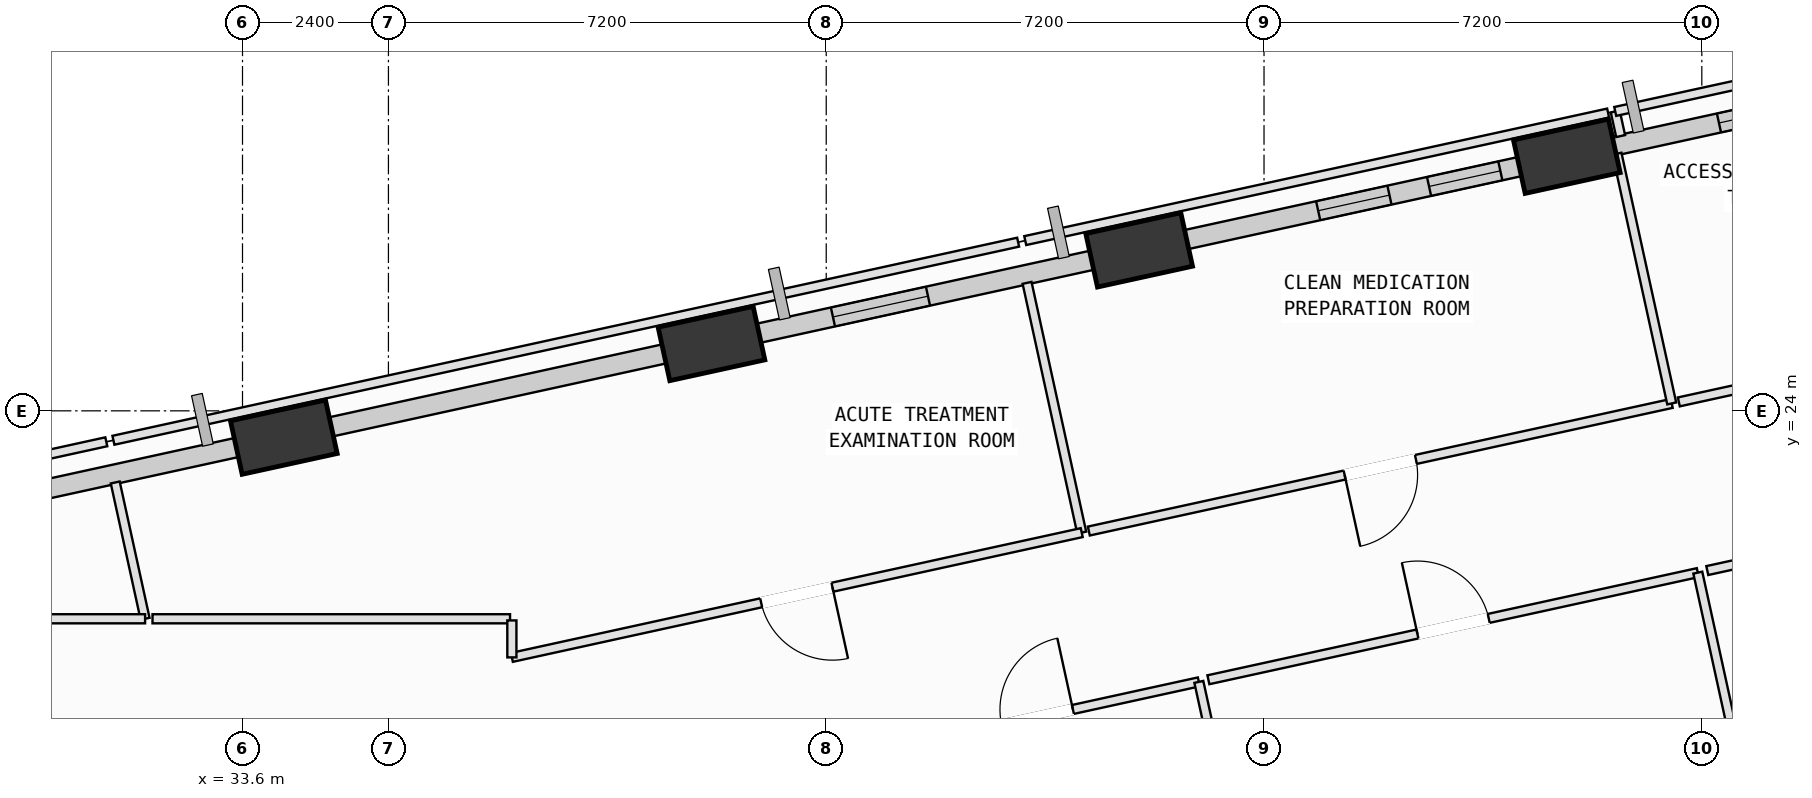
"""IFC4 building model, lengths in metres.
Left out: names, types, materials, properties, quantities, classifications, styles, units other than length and angle.
Written with IfcOpenShell. Run it as: python <this file> out.ifc"""

import sys

from ifc_helpers import new_model, si_unit, direction, frame, frame_2d, origin, origin_2d, place, context, subcontext, project, spatial, rectangle, extrude, element, fill, save


model = new_model("IFC4")
c1 = context("Model", 3, precision=1e-05, world=origin(), true_north=direction((0.0, 1.0)))
c2 = subcontext(c1, "Body", "Model", "MODEL_VIEW")
j1 = project(units=[si_unit("LENGTHUNIT", "METRE"), si_unit("PLANEANGLEUNIT", "RADIAN")], contexts=[c1])
p1 = place(None, origin())
s1 = spatial("IfcSite", under=j1, at=p1, CompositionType="ELEMENT")
p2 = place(p1, origin())
s2 = spatial("IfcBuilding", under=s1, at=p2, CompositionType="ELEMENT")
p3 = place(p2, frame((0.0, 0.0, 75.0)))
s3 = spatial("IfcBuildingStorey", under=s2, at=p3, CompositionType="ELEMENT", Elevation=75.0)
p4 = place(p3, frame((55.38, 28.187, 0.002), z_axis=(-0.014721816855, 0.089790916023, 0.995851826081), x_axis=(-0.929526427486, -0.368241610602, 0.019461161991)))
e1 = element("IfcColumn", 1, at=p4, inside=s3, PredefinedType="COLUMN", context=c2, shape_type="SweptSolid", body=[
    extrude(rectangle(XDim=1.6, YDim=0.9, at=origin_2d()), origin(), (0.0, 0.0, 1.0), 4.013),
])
p5 = place(p3, frame((48.346, 26.647, 0.002), z_axis=(-0.008109234679, 0.060971689318, 0.998106554139), x_axis=(-0.940187690802, -0.340402754479, 0.01315563785)))
e2 = element("IfcColumn", 2, at=p5, inside=s3, PredefinedType="COLUMN", context=c2, shape_type="SweptSolid", body=[
    extrude(rectangle(XDim=1.6, YDim=0.9, at=origin_2d()), origin(), (0.0, 0.0, 1.0), 4.004),
])
p6 = place(p3, frame((41.313, 25.107, 0.002), z_axis=(-0.001587456161, 0.031993347239, 0.999486821181), x_axis=(-0.965064978314, -0.261921072105, 0.00685124938)))
e3 = element("IfcColumn", 3, at=p6, inside=s3, PredefinedType="COLUMN", context=c2, shape_type="SweptSolid", body=[
    extrude(rectangle(XDim=1.6, YDim=0.9, at=origin_2d()), origin(), (0.0, 0.0, 1.0), 3.999),
])
p7 = place(p3, frame((34.28, 23.567, 0.002), z_axis=(0.005070165271, 0.002809971114, 0.999983198602), x_axis=(-0.660600935116, 0.750736216887, 0.001239829666)))
e4 = element("IfcColumn", 4, at=p7, inside=s3, PredefinedType="COLUMN", context=c2, shape_type="SweptSolid", body=[
    extrude(rectangle(XDim=1.6, YDim=0.9, at=origin_2d()), origin(), (0.0, 0.0, 1.0), 3.997),
])
p8 = place(p3, frame((55.956, 28.313, 0.0), z_axis=(0.0, 0.0, 1.0), x_axis=(0.976855050358, 0.213902338907, 0.0)))
e5 = element("IfcWall", 5, at=p8, inside=s3, PredefinedType="SOLIDWALL", context=c2, shape_type="SweptSolid", body=[
    extrude(rectangle(XDim=5.209, YDim=0.32, at=frame_2d((2.604, 0.0))), origin(), (0.0, 0.0, 1.0), 3.165),
])
p9 = place(p8, frame((1.972, 0.0, 0.75)))
e6 = element("IfcOpeningElement", 6, at=p9, cuts=e5, PredefinedType="OPENING", context=c2, shape_type="SweptSolid", body=[
    extrude(rectangle(XDim=1.8, YDim=2.05, at=frame_2d((0.9, 1.025))), frame((0.0, 0.17, 0.0), z_axis=(0.0, -1.0, 0.0), x_axis=(1.0, 0.0, 0.0)), (0.0, 0.0, 1.0), 0.34),
])
p10 = place(p3, frame((48.938, 26.776, 0.0), z_axis=(0.0, 0.0, 1.0), x_axis=(0.976857433448, 0.213891455455, 0.0)))
e7 = element("IfcWall", 7, at=p10, inside=s3, PredefinedType="SOLIDWALL", context=c2, shape_type="SweptSolid", body=[
    extrude(rectangle(XDim=6.024, YDim=0.32, at=frame_2d((3.012, 0.0))), origin(), (0.0, 0.0, 1.0), 3.165),
])
p11 = place(p10, frame((2.409, 0.0, 0.75)))
e8 = element("IfcOpeningElement", 8, at=p11, cuts=e7, PredefinedType="OPENING", context=c2, shape_type="SweptSolid", body=[
    extrude(rectangle(XDim=1.2, YDim=1.75, at=frame_2d((0.6, 0.875))), frame((0.0, 0.17, 0.0), z_axis=(0.0, -1.0, 0.0), x_axis=(1.0, 0.0, 0.0)), (0.0, 0.0, 1.0), 0.34),
])
p12 = place(p10, frame((4.275, 0.0, 0.75)))
e9 = element("IfcOpeningElement", 9, at=p12, cuts=e7, PredefinedType="OPENING", context=c2, shape_type="SweptSolid", body=[
    extrude(rectangle(XDim=1.2, YDim=1.75, at=frame_2d((0.6, 0.875))), frame((0.0, 0.17, 0.0), z_axis=(0.0, -1.0, 0.0), x_axis=(1.0, 0.0, 0.0)), (0.0, 0.0, 1.0), 0.34),
])
p13 = place(p3, frame((41.914, 25.238, 0.0), z_axis=(0.0, 0.0, 1.0), x_axis=(0.976860180351, 0.213878909769, 0.0)))
e10 = element("IfcWall", 10, at=p13, inside=s3, PredefinedType="SOLIDWALL", context=c2, shape_type="SweptSolid", body=[
    extrude(rectangle(XDim=6.0, YDim=0.32, at=frame_2d((3.0, 0.0))), origin(), (0.0, 0.0, 1.0), 3.165),
])
p14 = place(p13, frame((1.43, 0.0, 0.75)))
e11 = element("IfcOpeningElement", 11, at=p14, cuts=e10, PredefinedType="OPENING", context=c2, shape_type="SweptSolid", body=[
    extrude(rectangle(XDim=1.6, YDim=1.95, at=frame_2d((0.8, 0.975))), frame((0.0, 0.17, 0.0), z_axis=(0.0, -1.0, 0.0), x_axis=(1.0, 0.0, 0.0)), (0.0, 0.0, 1.0), 0.34),
])
p15 = place(p3, frame((34.884, 23.699, 0.0), z_axis=(0.0, 0.0, 1.0), x_axis=(0.976858764246, 0.213885377519, 0.0)))
e12 = element("IfcWall", 12, at=p15, inside=s3, PredefinedType="SOLIDWALL", context=c2, shape_type="SweptSolid", body=[
    extrude(rectangle(XDim=5.987, YDim=0.32, at=frame_2d((2.993, 0.0))), origin(), (0.0, 0.0, 1.0), 3.165),
])
p16 = place(p3, frame((28.093, 22.212, 0.0), z_axis=(0.0, 0.0, 1.0), x_axis=(0.976862240577, 0.213869499778, 0.0)))
e13 = element("IfcWall", 13, at=p16, inside=s3, PredefinedType="SOLIDWALL", context=c2, shape_type="SweptSolid", body=[
    extrude(rectangle(XDim=5.736, YDim=0.32, at=frame_2d((2.868, 0.0))), origin(), (0.0, 0.0, 1.0), 3.165),
])
p17 = place(p16, frame((0.928, 0.0, 0.75)))
e14 = element("IfcOpeningElement", 14, at=p17, cuts=e13, PredefinedType="OPENING", context=c2, shape_type="SweptSolid", body=[
    extrude(rectangle(XDim=1.4, YDim=1.85, at=frame_2d((0.7, 0.925))), frame((0.0, 0.17, 0.0), z_axis=(0.0, -1.0, 0.0), x_axis=(1.0, 0.0, 0.0)), (0.0, 0.0, 1.0), 0.34),
])
p18 = place(p3, frame((44.014, 18.379, 0.0), z_axis=(0.0, 0.0, 1.0), x_axis=(0.976874830537, 0.213811986248, 0.0)))
e15 = element("IfcWall", 15, at=p18, inside=s3, PredefinedType="PARTITIONING", context=c2, shape_type="SweptSolid", body=[
    extrude(rectangle(XDim=5.44, YDim=0.15, at=frame_2d((2.72, 0.0))), origin(), (0.0, 0.0, 1.0), 3.78),
])
p19 = place(p18, frame((2.12, 0.0, 0.0)))
e16 = element("IfcOpeningElement", 16, at=p19, cuts=e15, PredefinedType="OPENING", context=c2, shape_type="SweptSolid", body=[
    extrude(rectangle(XDim=1.2, YDim=2.15, at=frame_2d((0.6, 1.075))), frame((0.0, 0.085, 0.0), z_axis=(0.0, -1.0, 0.0), x_axis=(1.0, 0.0, 0.0)), (0.0, 0.0, 1.0), 0.17),
])
p20 = place(p3, frame((49.328, 19.542, 0.0), z_axis=(0.0, 0.0, 1.0), x_axis=(0.213971223399, -0.976839964148, 0.0)))
e17 = element("IfcWall", 17, at=p20, inside=s3, PredefinedType="PARTITIONING", context=c2, shape_type="SweptSolid", body=[
    extrude(rectangle(XDim=13.615, YDim=0.15, at=frame_2d((6.807, 0.0))), origin(), (0.0, 0.0, 1.0), 3.78),
])
p21 = place(p3, frame((49.485, 19.577, 0.0), z_axis=(0.0, 0.0, 1.0), x_axis=(0.976861340805, 0.213873609498, 0.0)))
e18 = element("IfcWall", 18, at=p21, inside=s3, PredefinedType="PARTITIONING", context=c2, shape_type="SweptSolid", body=[
    extrude(rectangle(XDim=8.24, YDim=0.15, at=frame_2d((4.12, 0.0))), origin(), (0.0, 0.0, 1.0), 3.78),
])
p22 = place(p21, frame((3.52, 0.0, 0.0)))
e19 = element("IfcOpeningElement", 19, at=p22, cuts=e18, PredefinedType="OPENING", context=c2, shape_type="SweptSolid", body=[
    extrude(rectangle(XDim=1.2, YDim=2.15, at=frame_2d((0.6, 1.075))), frame((0.0, 0.085, 0.0), z_axis=(0.0, -1.0, 0.0), x_axis=(1.0, 0.0, 0.0)), (0.0, 0.0, 1.0), 0.17),
])
p23 = place(p3, frame((57.534, 21.339, 0.0), z_axis=(0.0, 0.0, 1.0), x_axis=(0.213897858368, -0.976856031453, 0.0)))
e20 = element("IfcWall", 20, at=p23, inside=s3, PredefinedType="PARTITIONING", context=c2, shape_type="SweptSolid", body=[
    extrude(rectangle(XDim=11.665, YDim=0.15, at=frame_2d((5.833, 0.0))), origin(), (0.0, 0.0, 1.0), 3.78),
])
p24 = place(p3, frame((57.69, 21.373, 0.0), z_axis=(0.0, 0.0, 1.0), x_axis=(0.976850732773, 0.213922055621, 0.0)))
e21 = element("IfcWall", 21, at=p24, inside=s3, PredefinedType="PARTITIONING", context=c2, shape_type="SweptSolid", body=[
    extrude(rectangle(XDim=6.24, YDim=0.15, at=frame_2d((3.12, 0.0))), origin(), (0.0, 0.0, 1.0), 3.78),
])
p25 = place(p24, frame((2.52, 0.0, 0.0)))
e22 = element("IfcOpeningElement", 22, at=p25, cuts=e21, PredefinedType="OPENING", context=c2, shape_type="SweptSolid", body=[
    extrude(rectangle(XDim=1.2, YDim=2.15, at=frame_2d((0.6, 1.075))), frame((0.0, 0.085, 0.0), z_axis=(0.0, -1.0, 0.0), x_axis=(1.0, 0.0, 0.0)), (0.0, 0.0, 1.0), 0.17),
])
p26 = place(p3, frame((27.91, 22.735, 0.0), z_axis=(0.0, 0.0, 1.0), x_axis=(0.976833231196, 0.214001958943, 0.0)))
e23 = element("IfcWall", 23, at=p26, inside=s3, PredefinedType="PARTITIONING", context=c2, shape_type="SweptSolid", body=[
    extrude(rectangle(XDim=3.532, YDim=0.15, at=frame_2d((1.766, 0.0))), origin(), (0.0, 0.0, 1.0), 3.78),
])
p27 = place(p3, frame((31.507, 22.822, 0.0), z_axis=(0.0, 0.0, 1.0), x_axis=(0.213922116601, -0.976850719419, 0.0)))
e24 = element("IfcWall", 24, at=p27, inside=s3, PredefinedType="PARTITIONING", context=c2, shape_type="SweptSolid", body=[
    extrude(rectangle(XDim=2.295, YDim=0.15, at=frame_2d((1.147, 0.0))), origin(), (0.0, 0.0, 1.0), 3.78),
])
p28 = place(p3, frame((31.998, 20.58, 0.0), z_axis=(0.0, 0.0, 1.0), x_axis=(-1.0, 0.0, 0.0)))
e25 = element("IfcWall", 25, at=p28, inside=s3, PredefinedType="PARTITIONING", context=c2, shape_type="SweptSolid", body=[
    extrude(rectangle(XDim=12.819, YDim=0.15, at=frame_2d((6.41, 0.0))), origin(), (0.0, 0.0, 1.0), 3.78),
])
p29 = place(p28, frame((5.81, 0.0, 0.0)))
e26 = element("IfcOpeningElement", 26, at=p29, cuts=e25, PredefinedType="OPENING", context=c2, shape_type="SweptSolid", body=[
    extrude(rectangle(XDim=1.2, YDim=2.15, at=frame_2d((0.6, 1.075))), frame((0.0, 0.085, 0.0), z_axis=(0.0, -1.0, 0.0), x_axis=(1.0, 0.0, 0.0)), (0.0, 0.0, 1.0), 0.17),
])
p30 = place(p3, frame((38.0, 20.58, 0.0), z_axis=(0.0, 0.0, 1.0), x_axis=(-1.0, 0.0, 0.0)))
e27 = element("IfcWall", 27, at=p30, inside=s3, PredefinedType="PARTITIONING", context=c2, shape_type="SweptSolid", body=[
    extrude(rectangle(XDim=5.88, YDim=0.15, at=frame_2d((2.94, 0.0))), origin(), (0.0, 0.0, 1.0), 3.365),
])
p31 = place(p3, frame((31.477, 23.516, 0.0), z_axis=(0.0, 0.0, 1.0), x_axis=(0.976858171476, 0.213888084802, 0.0)))
e28 = element("IfcWall", 28, at=p31, inside=s3, PredefinedType="PARTITIONING", context=c2, shape_type="SweptSolid", body=[
    extrude(rectangle(XDim=15.231, YDim=0.15, at=frame_2d((7.616, 0.0))), origin(), (0.0, 0.0, 1.0), 3.165),
])
p32 = place(p3, frame((46.503, 26.105, 0.0), z_axis=(0.0, 0.0, 1.0), x_axis=(0.213825003403, -0.976871981336, 0.0)))
e29 = element("IfcWall", 29, at=p32, inside=s3, PredefinedType="PARTITIONING", context=c2, shape_type="SweptSolid", body=[
    extrude(rectangle(XDim=4.205, YDim=0.15, at=frame_2d((2.103, 0.0))), origin(), (0.0, 0.0, 1.0), 3.78),
])
p33 = place(p3, frame((47.402, 21.997, 0.0), z_axis=(0.0, 0.0, 1.0), x_axis=(-0.976859493343, -0.213882047555, 0.0)))
e30 = element("IfcWall", 30, at=p33, inside=s3, PredefinedType="PARTITIONING", context=c2, shape_type="SweptSolid", body=[
    extrude(rectangle(XDim=9.594, YDim=0.15, at=frame_2d((4.797, 0.0))), origin(), (0.0, 0.0, 1.0), 3.78),
])
p34 = place(p33, frame((4.197, 0.0, 0.0)))
e31 = element("IfcOpeningElement", 31, at=p34, cuts=e30, PredefinedType="OPENING", context=c2, shape_type="SweptSolid", body=[
    extrude(rectangle(XDim=1.2, YDim=2.15, at=frame_2d((0.6, 1.075))), frame((0.0, 0.085, 0.0), z_axis=(0.0, -1.0, 0.0), x_axis=(1.0, 0.0, 0.0)), (0.0, 0.0, 1.0), 0.17),
])
p35 = place(p3, frame((38.03, 19.945, 0.0), z_axis=(0.0, 0.0, 1.0), x_axis=(0.0, 1.0, 0.0)))
e32 = element("IfcWall", 32, at=p35, inside=s3, PredefinedType="PARTITIONING", context=c2, shape_type="SweptSolid", body=[
    extrude(rectangle(XDim=0.608, YDim=0.15, at=frame_2d((0.304, 0.0))), origin(), (0.0, 0.0, 1.0), 3.78),
])
p36 = place(p3, frame((57.105, 24.122, 0.0), z_axis=(0.0, 0.0, 1.0), x_axis=(-0.976853250056, -0.213910560411, 0.0)))
e33 = element("IfcWall", 33, at=p36, inside=s3, PredefinedType="PARTITIONING", context=c2, shape_type="SweptSolid", body=[
    extrude(rectangle(XDim=9.813, YDim=0.15, at=frame_2d((4.906, 0.0))), origin(), (0.0, 0.0, 1.0), 3.78),
])
p37 = place(p36, frame((4.307, 0.0, 0.0)))
e34 = element("IfcOpeningElement", 34, at=p37, cuts=e33, PredefinedType="OPENING", context=c2, shape_type="SweptSolid", body=[
    extrude(rectangle(XDim=1.2, YDim=2.15, at=frame_2d((0.6, 1.075))), frame((0.0, 0.085, 0.0), z_axis=(0.0, -1.0, 0.0), x_axis=(1.0, 0.0, 0.0)), (0.0, 0.0, 1.0), 0.17),
])
p38 = place(p3, frame((46.473, 26.8, 0.0), z_axis=(0.0, 0.0, 1.0), x_axis=(0.976880374266, 0.21378665621, 0.0)))
e35 = element("IfcWall", 35, at=p38, inside=s3, PredefinedType="PARTITIONING", context=c2, shape_type="SweptSolid", body=[
    extrude(rectangle(XDim=9.813, YDim=0.15, at=frame_2d((4.906, 0.0))), origin(), (0.0, 0.0, 1.0), 3.165),
])
p39 = place(p3, frame((56.205, 28.229, 0.0), z_axis=(0.0, 0.0, 1.0), x_axis=(0.214039755438, -0.976824950076, 0.0)))
e36 = element("IfcWall", 36, at=p39, inside=s3, PredefinedType="PARTITIONING", context=c2, shape_type="SweptSolid", body=[
    extrude(rectangle(XDim=4.204, YDim=0.15, at=frame_2d((2.102, 0.0))), origin(), (0.0, 0.0, 1.0), 3.78),
])
p40 = place(p3, frame((63.033, 25.42, 0.0), z_axis=(0.0, 0.0, 1.0), x_axis=(-0.97683732514, -0.213983270871, 0.0)))
e37 = element("IfcWall", 37, at=p40, inside=s3, PredefinedType="PARTITIONING", context=c2, shape_type="SweptSolid", body=[
    extrude(rectangle(XDim=5.949, YDim=0.15, at=frame_2d((2.974, 0.0))), origin(), (0.0, 0.0, 1.0), 3.78),
])
p41 = place(p40, frame((2.514, 0.0, 0.0)))
e38 = element("IfcOpeningElement", 38, at=p41, cuts=e37, PredefinedType="OPENING", context=c2, shape_type="SweptSolid", body=[
    extrude(rectangle(XDim=0.92, YDim=2.1, at=frame_2d((0.46, 1.05))), frame((0.0, 0.085, 0.0), z_axis=(0.0, -1.0, 0.0), x_axis=(1.0, 0.0, 0.0)), (0.0, 0.0, 1.0), 0.17),
])
p42 = place(p3, frame((56.265, 28.519, 0.0), z_axis=(0.0, 0.0, 1.0), x_axis=(-0.21431139353, 0.976765389745, 0.0)))
e39 = element("IfcWall", 39, at=p42, inside=s3, PredefinedType="PARTITIONING", context=c2, shape_type="SweptSolid", body=[
    extrude(rectangle(XDim=0.415, YDim=0.15, at=frame_2d((0.207, 0.0))), origin(), (0.0, 0.0, 1.0), 3.78),
])
p43 = place(p3, frame((56.176, 28.924, 0.0), z_axis=(0.0, 0.0, 1.0), x_axis=(0.976848982064, 0.213930049879, 0.0)))
e40 = element("IfcWall", 40, at=p43, inside=s3, PredefinedType="PARTITIONING", context=c2, shape_type="SweptSolid", body=[
    extrude(rectangle(XDim=5.964, YDim=0.15, at=frame_2d((2.982, 0.0))), origin(), (0.0, 0.0, 1.0), 3.165),
])
p44 = place(p9, origin())
e41 = element("IfcWindow", 41, at=p44, inside=s3, PartitioningType="SINGLE_PANEL", PredefinedType="WINDOW", context=c2, shape_type="SweptSolid", body=[
    extrude(rectangle(XDim=1.8, YDim=2.05, at=frame_2d((0.9, 1.025))), frame((0.0, 0.03, 0.0), z_axis=(0.0, -1.0, 0.0), x_axis=(1.0, 0.0, 0.0)), (0.0, 0.0, 1.0), 0.06),
])
fill(e6, e41)
p45 = place(p11, origin())
e42 = element("IfcWindow", 42, at=p45, inside=s3, PartitioningType="SINGLE_PANEL", PredefinedType="WINDOW", context=c2, shape_type="SweptSolid", body=[
    extrude(rectangle(XDim=1.2, YDim=1.75, at=frame_2d((0.6, 0.875))), frame((0.0, 0.03, 0.0), z_axis=(0.0, -1.0, 0.0), x_axis=(1.0, 0.0, 0.0)), (0.0, 0.0, 1.0), 0.06),
])
fill(e8, e42)
p46 = place(p12, origin())
e43 = element("IfcWindow", 43, at=p46, inside=s3, PartitioningType="SINGLE_PANEL", PredefinedType="WINDOW", context=c2, shape_type="SweptSolid", body=[
    extrude(rectangle(XDim=1.2, YDim=1.75, at=frame_2d((0.6, 0.875))), frame((0.0, 0.03, 0.0), z_axis=(0.0, -1.0, 0.0), x_axis=(1.0, 0.0, 0.0)), (0.0, 0.0, 1.0), 0.06),
])
fill(e9, e43)
p47 = place(p14, origin())
e44 = element("IfcWindow", 44, at=p47, inside=s3, PartitioningType="SINGLE_PANEL", PredefinedType="WINDOW", context=c2, shape_type="SweptSolid", body=[
    extrude(rectangle(XDim=1.6, YDim=1.95, at=frame_2d((0.8, 0.975))), frame((0.0, 0.03, 0.0), z_axis=(0.0, -1.0, 0.0), x_axis=(1.0, 0.0, 0.0)), (0.0, 0.0, 1.0), 0.06),
])
fill(e11, e44)
p48 = place(p19, origin())
e45 = element("IfcDoor", 45, at=p48, inside=s3, OperationType="SINGLE_SWING_RIGHT", PredefinedType="DOOR", context=c2, shape_type="SweptSolid", body=[
    extrude(rectangle(XDim=1.2, YDim=2.15, at=frame_2d((0.6, 1.075))), frame((0.0, 0.025, 0.0), z_axis=(0.0, -1.0, 0.0), x_axis=(1.0, 0.0, 0.0)), (0.0, 0.0, 1.0), 0.05),
])
fill(e16, e45)
p49 = place(p22, origin())
e46 = element("IfcDoor", 46, at=p49, inside=s3, OperationType="SINGLE_SWING_LEFT", PredefinedType="DOOR", context=c2, shape_type="SweptSolid", body=[
    extrude(rectangle(XDim=1.2, YDim=2.15, at=frame_2d((0.6, 1.075))), frame((0.0, 0.025, 0.0), z_axis=(0.0, -1.0, 0.0), x_axis=(1.0, 0.0, 0.0)), (0.0, 0.0, 1.0), 0.05),
])
fill(e19, e46)
p50 = place(p34, origin())
e47 = element("IfcDoor", 47, at=p50, inside=s3, OperationType="SINGLE_SWING_LEFT", PredefinedType="DOOR", context=c2, shape_type="SweptSolid", body=[
    extrude(rectangle(XDim=1.2, YDim=2.15, at=frame_2d((0.6, 1.075))), frame((0.0, 0.025, 0.0), z_axis=(0.0, -1.0, 0.0), x_axis=(1.0, 0.0, 0.0)), (0.0, 0.0, 1.0), 0.05),
])
fill(e31, e47)
p51 = place(p37, origin())
e48 = element("IfcDoor", 48, at=p51, inside=s3, OperationType="SINGLE_SWING_RIGHT", PredefinedType="DOOR", context=c2, shape_type="SweptSolid", body=[
    extrude(rectangle(XDim=1.2, YDim=2.15, at=frame_2d((0.6, 1.075))), frame((0.0, 0.025, 0.0), z_axis=(0.0, -1.0, 0.0), x_axis=(1.0, 0.0, 0.0)), (0.0, 0.0, 1.0), 0.05),
])
fill(e34, e48)
save(model, sys.argv[1])
